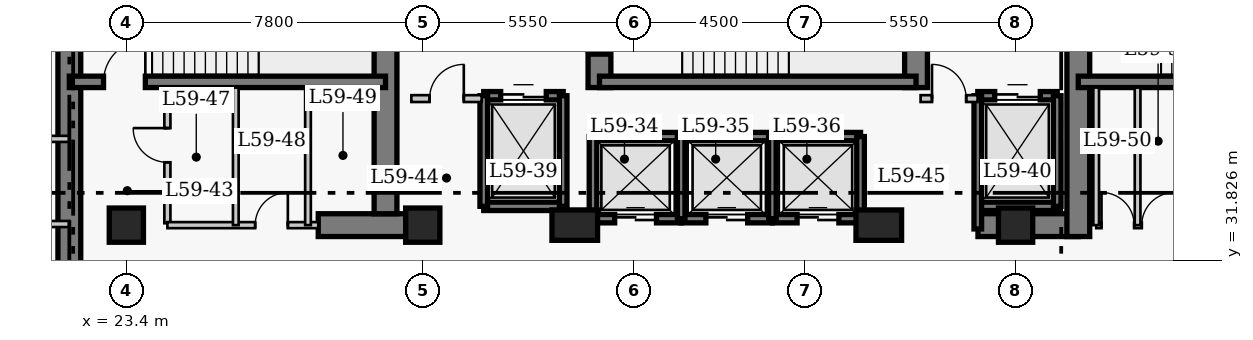
"""IFC4 building model, lengths in metres.
Left out: names, types, materials, properties, quantities, classifications, styles, units other than length and angle.
Written with IfcOpenShell. Run it as: python <this file> out.ifc"""

import sys

from ifc_helpers import new_model, si_unit, direction, frame, frame_2d, origin, origin_2d, place, context, subcontext, project, spatial, rectangle, extrude, element, fill, save


model = new_model("IFC4")
c1 = context("Model", 3, precision=1e-05, world=origin(), true_north=direction((0.0, 1.0)))
c2 = subcontext(c1, "Body", "Model", "MODEL_VIEW")
j1 = project(units=[si_unit("LENGTHUNIT", "METRE"), si_unit("PLANEANGLEUNIT", "RADIAN")], contexts=[c1])
p1 = place(None, origin())
s1 = spatial("IfcSite", under=j1, at=p1, CompositionType="ELEMENT")
p2 = place(p1, origin())
s2 = spatial("IfcBuilding", under=s1, at=p2, CompositionType="ELEMENT")
p3 = place(p2, frame((0.0, 0.0, 236.5)))
s3 = spatial("IfcBuildingStorey", under=s2, at=p3, CompositionType="ELEMENT", Elevation=236.5)
p4 = place(p3, frame((21.9, 27.05, 0.0), z_axis=(0.0, 0.0, 1.0), x_axis=(0.0, 1.0, 0.0)))
e1 = element("IfcWall", 1, at=p4, inside=s3, PredefinedType="SHEAR", context=c2, shape_type="SweptSolid", body=[
    extrude(rectangle(XDim=13.57, YDim=0.6, at=frame_2d((6.785, 0.0))), origin(), (0.0, 0.0, 1.0), 3.9),
])
p5 = place(p3, frame((28.45, 32.75, 0.0), z_axis=(0.0, 0.0, 1.0), x_axis=(1.0, 0.0, 0.0)))
e2 = element("IfcWall", 2, at=p5, inside=s3, PredefinedType="SHEAR", context=c2, shape_type="SweptSolid", body=[
    extrude(rectangle(XDim=2.4, YDim=0.6, at=frame_2d((1.2, 0.0))), origin(), (0.0, 0.0, 1.0), 3.9),
])
p6 = place(p3, frame((45.81, 32.75, 0.0), z_axis=(0.0, 0.0, 1.0), x_axis=(1.0, 0.0, 0.0)))
e3 = element("IfcWall", 3, at=p6, inside=s3, PredefinedType="SHEAR", context=c2, shape_type="SweptSolid", body=[
    extrude(rectangle(XDim=2.64, YDim=0.6, at=frame_2d((1.32, 0.0))), origin(), (0.0, 0.0, 1.0), 3.9),
])
p7 = place(p3, frame((30.22, 33.05, 0.0), z_axis=(0.0, 0.0, 1.0), x_axis=(0.0, 1.0, 0.0)))
e4 = element("IfcWall", 4, at=p7, inside=s3, PredefinedType="SHEAR", context=c2, shape_type="SweptSolid", body=[
    extrude(rectangle(XDim=7.27, YDim=0.6, at=frame_2d((3.635, 0.0))), origin(), (0.0, 0.0, 1.0), 3.9),
])
p8 = place(p3, frame((35.85, 36.37, 0.0), z_axis=(0.0, 0.0, 1.0), x_axis=(0.0, 1.0, 0.0)))
e5 = element("IfcWall", 5, at=p8, inside=s3, PredefinedType="SHEAR", context=c2, shape_type="SweptSolid", body=[
    extrude(rectangle(XDim=3.95, YDim=0.6, at=frame_2d((1.975, 0.0))), origin(), (0.0, 0.0, 1.0), 3.9),
])
p9 = place(p8, frame((0.88, 0.0, 0.0)))
e6 = element("IfcOpeningElement", 6, at=p9, cuts=e5, PredefinedType="OPENING", context=c2, shape_type="SweptSolid", body=[
    extrude(rectangle(XDim=1.1, YDim=2.15, at=frame_2d((0.55, 1.075))), frame((0.0, 0.31, 0.0), z_axis=(0.0, -1.0, 0.0), x_axis=(1.0, 0.0, 0.0)), (0.0, 0.0, 1.0), 0.62),
])
p10 = place(p3, frame((44.18, 36.37, 0.0), z_axis=(0.0, 0.0, 1.0), x_axis=(0.0, 1.0, 0.0)))
e7 = element("IfcWall", 7, at=p10, inside=s3, PredefinedType="SHEAR", context=c2, shape_type="SweptSolid", body=[
    extrude(rectangle(XDim=3.95, YDim=0.6, at=frame_2d((1.975, 0.0))), origin(), (0.0, 0.0, 1.0), 3.9),
])
p11 = place(p3, frame((48.45, 32.45, 0.0), z_axis=(0.0, 0.0, 1.0), x_axis=(0.0, 1.0, 0.0)))
e8 = element("IfcWall", 8, at=p11, inside=s3, PredefinedType="SHEAR", context=c2, shape_type="SweptSolid", body=[
    extrude(rectangle(XDim=7.87, YDim=0.6, at=frame_2d((3.935, 0.0))), origin(), (0.0, 0.0, 1.0), 3.9),
])
p12 = place(p11, frame((5.75, 0.0, 0.0)))
e9 = element("IfcOpeningElement", 9, at=p12, cuts=e8, PredefinedType="OPENING", context=c2, shape_type="SweptSolid", body=[
    extrude(rectangle(XDim=1.1, YDim=2.15, at=frame_2d((0.55, 1.075))), frame((0.0, 0.31, 0.0), z_axis=(0.0, -1.0, 0.0), x_axis=(1.0, 0.0, 0.0)), (0.0, 0.0, 1.0), 0.62),
])
p13 = place(p3, frame((21.9, 36.52, 0.0), z_axis=(0.0, 0.0, 1.0), x_axis=(1.0, 0.0, 0.0)))
e10 = element("IfcWall", 10, at=p13, inside=s3, PredefinedType="SHEAR", context=c2, shape_type="SweptSolid", body=[
    extrude(rectangle(XDim=8.32, YDim=0.3, at=frame_2d((4.16, 0.0))), origin(), (0.0, 0.0, 1.0), 3.9),
])
p14 = place(p13, frame((0.9, 0.0, 0.0)))
e11 = element("IfcOpeningElement", 11, at=p14, cuts=e10, PredefinedType="OPENING", context=c2, shape_type="SweptSolid", body=[
    extrude(rectangle(XDim=1.1, YDim=2.15, at=frame_2d((0.55, 1.075))), frame((0.0, 0.16, 0.0), z_axis=(0.0, -1.0, 0.0), x_axis=(1.0, 0.0, 0.0)), (0.0, 0.0, 1.0), 0.32),
])
p15 = place(p3, frame((35.85, 36.52, 0.0), z_axis=(0.0, 0.0, 1.0), x_axis=(1.0, 0.0, 0.0)))
e12 = element("IfcWall", 12, at=p15, inside=s3, PredefinedType="SHEAR", context=c2, shape_type="SweptSolid", body=[
    extrude(rectangle(XDim=8.33, YDim=0.3, at=frame_2d((4.165, 0.0))), origin(), (0.0, 0.0, 1.0), 3.9),
])
p16 = place(p3, frame((48.45, 36.52, 0.0), z_axis=(0.0, 0.0, 1.0), x_axis=(1.0, 0.0, 0.0)))
e13 = element("IfcWall", 13, at=p16, inside=s3, PredefinedType="SHEAR", context=c2, shape_type="SweptSolid", body=[
    extrude(rectangle(XDim=8.37, YDim=0.3, at=frame_2d((4.185, 0.0))), origin(), (0.0, 0.0, 1.0), 3.9),
])
for number, where, z_axis, x_axis in (
    (14, (23.4, 32.75, 0.0), (0.0, 0.0, 1.0), (1.0, 0.0, 0.0)),
    (15, (31.2, 32.75, 0.0), (0.0, 0.0, 1.0), (1.0, 0.0, 0.0)),
):
    element("IfcColumn", number, at=place(p3, frame(where, z_axis=z_axis, x_axis=x_axis)), inside=s3, PredefinedType="COLUMN", context=c2, shape_type="SweptSolid", body=[
        extrude(rectangle(XDim=0.9, YDim=0.9, at=origin_2d()), origin(), (0.0, 0.0, 1.0), 3.9),
    ])
for number, where, z_axis, x_axis in (
    (16, (35.2, 32.75, 0.0), (0.0, 0.0, 1.0), (1.0, 0.0, 0.0)),
    (17, (43.2, 32.75, 0.0), (0.0, 0.0, 1.0), (1.0, 0.0, 0.0)),
):
    element("IfcColumn", number, at=place(p3, frame(where, z_axis=z_axis, x_axis=x_axis)), inside=s3, PredefinedType="COLUMN", context=c2, shape_type="SweptSolid", body=[
        extrude(rectangle(XDim=1.2, YDim=0.8, at=origin_2d()), origin(), (0.0, 0.0, 1.0), 3.9),
    ])
p17 = place(p3, frame((46.8, 32.75, 0.0), z_axis=(0.0, 0.0, 1.0), x_axis=(1.0, 0.0, 0.0)))
e18 = element("IfcColumn", 18, at=p17, inside=s3, PredefinedType="COLUMN", context=c2, shape_type="SweptSolid", body=[
    extrude(rectangle(XDim=0.9, YDim=0.9, at=origin_2d()), origin(), (0.0, 0.0, 1.0), 3.9),
])
p18 = place(p3, frame((35.68, 35.08, 0.0), z_axis=(0.0, 0.0, 1.0), x_axis=(1.0, 0.0, 0.0)))
e19 = element("IfcWall", 19, at=p18, inside=s3, PredefinedType="SHEAR", context=c2, shape_type="SweptSolid", body=[
    extrude(rectangle(XDim=2.32, YDim=0.22, at=frame_2d((1.16, 0.0))), origin(), (0.0, 0.0, 1.0), 3.9),
])
p19 = place(p3, frame((35.68, 32.92, 0.0), z_axis=(0.0, 0.0, 1.0), x_axis=(1.0, 0.0, 0.0)))
e20 = element("IfcWall", 20, at=p19, inside=s3, PredefinedType="SHEAR", context=c2, shape_type="SweptSolid", body=[
    extrude(rectangle(XDim=2.32, YDim=0.22, at=frame_2d((1.16, 0.0))), origin(), (0.0, 0.0, 1.0), 3.9),
])
p20 = place(p19, frame((0.57, 0.0, 0.0)))
e21 = element("IfcOpeningElement", 21, at=p20, cuts=e20, PredefinedType="OPENING", context=c2, shape_type="SweptSolid", body=[
    extrude(rectangle(XDim=1.1, YDim=2.15, at=frame_2d((0.55, 1.075))), frame((0.0, 0.12, 0.0), z_axis=(0.0, -1.0, 0.0), x_axis=(1.0, 0.0, 0.0)), (0.0, 0.0, 1.0), 0.24),
])
p21 = place(p3, frame((35.68, 32.92, 0.0), z_axis=(0.0, 0.0, 1.0), x_axis=(0.0, 1.0, 0.0)))
e22 = element("IfcWall", 22, at=p21, inside=s3, PredefinedType="SHEAR", context=c2, shape_type="SweptSolid", body=[
    extrude(rectangle(XDim=2.16, YDim=0.2, at=frame_2d((1.08, 0.0))), origin(), (0.0, 0.0, 1.0), 3.9),
])
p22 = place(p3, frame((38.0, 35.08, 0.0), z_axis=(0.0, 0.0, 1.0), x_axis=(1.0, 0.0, 0.0)))
e23 = element("IfcWall", 23, at=p22, inside=s3, PredefinedType="SHEAR", context=c2, shape_type="SweptSolid", body=[
    extrude(rectangle(XDim=2.4, YDim=0.22, at=frame_2d((1.2, 0.0))), origin(), (0.0, 0.0, 1.0), 3.9),
])
p23 = place(p3, frame((38.0, 32.92, 0.0), z_axis=(0.0, 0.0, 1.0), x_axis=(1.0, 0.0, 0.0)))
e24 = element("IfcWall", 24, at=p23, inside=s3, PredefinedType="SHEAR", context=c2, shape_type="SweptSolid", body=[
    extrude(rectangle(XDim=2.4, YDim=0.22, at=frame_2d((1.2, 0.0))), origin(), (0.0, 0.0, 1.0), 3.9),
])
p24 = place(p23, frame((0.65, 0.0, 0.0)))
e25 = element("IfcOpeningElement", 25, at=p24, cuts=e24, PredefinedType="OPENING", context=c2, shape_type="SweptSolid", body=[
    extrude(rectangle(XDim=1.1, YDim=2.15, at=frame_2d((0.55, 1.075))), frame((0.0, 0.12, 0.0), z_axis=(0.0, -1.0, 0.0), x_axis=(1.0, 0.0, 0.0)), (0.0, 0.0, 1.0), 0.24),
])
p25 = place(p3, frame((38.0, 32.92, 0.0), z_axis=(0.0, 0.0, 1.0), x_axis=(0.0, 1.0, 0.0)))
e26 = element("IfcWall", 26, at=p25, inside=s3, PredefinedType="SHEAR", context=c2, shape_type="SweptSolid", body=[
    extrude(rectangle(XDim=2.16, YDim=0.2, at=frame_2d((1.08, 0.0))), origin(), (0.0, 0.0, 1.0), 3.9),
])
p26 = place(p3, frame((40.4, 35.08, 0.0), z_axis=(0.0, 0.0, 1.0), x_axis=(1.0, 0.0, 0.0)))
e27 = element("IfcWall", 27, at=p26, inside=s3, PredefinedType="SHEAR", context=c2, shape_type="SweptSolid", body=[
    extrude(rectangle(XDim=2.32, YDim=0.22, at=frame_2d((1.16, 0.0))), origin(), (0.0, 0.0, 1.0), 3.9),
])
p27 = place(p3, frame((40.4, 32.92, 0.0), z_axis=(0.0, 0.0, 1.0), x_axis=(1.0, 0.0, 0.0)))
e28 = element("IfcWall", 28, at=p27, inside=s3, PredefinedType="SHEAR", context=c2, shape_type="SweptSolid", body=[
    extrude(rectangle(XDim=2.32, YDim=0.22, at=frame_2d((1.16, 0.0))), origin(), (0.0, 0.0, 1.0), 3.9),
])
p28 = place(p27, frame((0.65, 0.0, 0.0)))
e29 = element("IfcOpeningElement", 29, at=p28, cuts=e28, PredefinedType="OPENING", context=c2, shape_type="SweptSolid", body=[
    extrude(rectangle(XDim=1.1, YDim=2.15, at=frame_2d((0.55, 1.075))), frame((0.0, 0.12, 0.0), z_axis=(0.0, -1.0, 0.0), x_axis=(1.0, 0.0, 0.0)), (0.0, 0.0, 1.0), 0.24),
])
for number, where, z_axis, x_axis in (
    (30, (40.4, 32.92, 0.0), (0.0, 0.0, 1.0), (0.0, 1.0, 0.0)),
    (31, (42.72, 32.92, 0.0), (0.0, 0.0, 1.0), (0.0, 1.0, 0.0)),
):
    element("IfcWall", number, at=place(p3, frame(where, z_axis=z_axis, x_axis=x_axis)), inside=s3, PredefinedType="SHEAR", context=c2, shape_type="SweptSolid", body=[
        extrude(rectangle(XDim=2.16, YDim=0.2, at=frame_2d((1.08, 0.0))), origin(), (0.0, 0.0, 1.0), 3.9),
    ])
p29 = place(p3, frame((32.805, 36.155, 0.0), z_axis=(0.0, 0.0, 1.0), x_axis=(1.0, 0.0, 0.0)))
e32 = element("IfcWall", 32, at=p29, inside=s3, PredefinedType="SHEAR", context=c2, shape_type="SweptSolid", body=[
    extrude(rectangle(XDim=2.09, YDim=0.22, at=frame_2d((1.045, 0.0))), origin(), (0.0, 0.0, 1.0), 3.9),
])
p30 = place(p29, frame((0.445, 0.0, 0.0)))
e33 = element("IfcOpeningElement", 33, at=p30, cuts=e32, PredefinedType="OPENING", context=c2, shape_type="SweptSolid", body=[
    extrude(rectangle(XDim=1.2, YDim=2.15, at=frame_2d((0.6, 1.075))), frame((0.0, 0.12, 0.0), z_axis=(0.0, -1.0, 0.0), x_axis=(1.0, 0.0, 0.0)), (0.0, 0.0, 1.0), 0.24),
])
p31 = place(p3, frame((32.805, 33.245, 0.0), z_axis=(0.0, 0.0, 1.0), x_axis=(1.0, 0.0, 0.0)))
e34 = element("IfcWall", 34, at=p31, inside=s3, PredefinedType="SHEAR", context=c2, shape_type="SweptSolid", body=[
    extrude(rectangle(XDim=2.09, YDim=0.22, at=frame_2d((1.045, 0.0))), origin(), (0.0, 0.0, 1.0), 3.9),
])
for number, where, z_axis, x_axis in (
    (35, (32.805, 33.245, 0.0), (0.0, 0.0, 1.0), (0.0, 1.0, 0.0)),
    (36, (34.895, 33.245, 0.0), (0.0, 0.0, 1.0), (0.0, 1.0, 0.0)),
):
    element("IfcWall", number, at=place(p3, frame(where, z_axis=z_axis, x_axis=x_axis)), inside=s3, PredefinedType="SHEAR", context=c2, shape_type="SweptSolid", body=[
        extrude(rectangle(XDim=2.91, YDim=0.2, at=frame_2d((1.455, 0.0))), origin(), (0.0, 0.0, 1.0), 3.9),
    ])
p32 = place(p3, frame((45.805, 36.155, 0.0), z_axis=(0.0, 0.0, 1.0), x_axis=(1.0, 0.0, 0.0)))
e37 = element("IfcWall", 37, at=p32, inside=s3, PredefinedType="SHEAR", context=c2, shape_type="SweptSolid", body=[
    extrude(rectangle(XDim=2.09, YDim=0.22, at=frame_2d((1.045, 0.0))), origin(), (0.0, 0.0, 1.0), 3.9),
])
p33 = place(p32, frame((0.445, 0.0, 0.0)))
e38 = element("IfcOpeningElement", 38, at=p33, cuts=e37, PredefinedType="OPENING", context=c2, shape_type="SweptSolid", body=[
    extrude(rectangle(XDim=1.2, YDim=2.15, at=frame_2d((0.6, 1.075))), frame((0.0, 0.12, 0.0), z_axis=(0.0, -1.0, 0.0), x_axis=(1.0, 0.0, 0.0)), (0.0, 0.0, 1.0), 0.24),
])
p34 = place(p3, frame((45.805, 33.245, 0.0), z_axis=(0.0, 0.0, 1.0), x_axis=(1.0, 0.0, 0.0)))
e39 = element("IfcWall", 39, at=p34, inside=s3, PredefinedType="SHEAR", context=c2, shape_type="SweptSolid", body=[
    extrude(rectangle(XDim=2.09, YDim=0.22, at=frame_2d((1.045, 0.0))), origin(), (0.0, 0.0, 1.0), 3.9),
])
p35 = place(p3, frame((45.805, 32.65, 0.0), z_axis=(0.0, 0.0, 1.0), x_axis=(0.0, 1.0, 0.0)))
e40 = element("IfcWall", 40, at=p35, inside=s3, PredefinedType="SHEAR", context=c2, shape_type="SweptSolid", body=[
    extrude(rectangle(XDim=3.505, YDim=0.2, at=frame_2d((1.752, 0.0))), origin(), (0.0, 0.0, 1.0), 3.9),
])
p36 = place(p3, frame((47.895, 33.245, 0.0), z_axis=(0.0, 0.0, 1.0), x_axis=(0.0, 1.0, 0.0)))
e41 = element("IfcWall", 41, at=p36, inside=s3, PredefinedType="SHEAR", context=c2, shape_type="SweptSolid", body=[
    extrude(rectangle(XDim=2.91, YDim=0.2, at=frame_2d((1.455, 0.0))), origin(), (0.0, 0.0, 1.0), 3.9),
])
p37 = place(p3, frame((30.9, 36.08, 0.0), z_axis=(0.0, 0.0, 1.0), x_axis=(1.0, 0.0, 0.0)))
e42 = element("IfcWall", 42, at=p37, inside=s3, PredefinedType="PARTITIONING", context=c2, shape_type="SweptSolid", body=[
    extrude(rectangle(XDim=1.85, YDim=0.18, at=frame_2d((0.925, 0.0))), origin(), (0.0, 0.0, 1.0), 3.52),
])
p38 = place(p37, frame((0.48, 0.0, 0.0)))
e43 = element("IfcOpeningElement", 43, at=p38, cuts=e42, PredefinedType="OPENING", context=c2, shape_type="SweptSolid", body=[
    extrude(rectangle(XDim=0.9, YDim=2.15, at=frame_2d((0.45, 1.075))), frame((0.0, 0.1, 0.0), z_axis=(0.0, -1.0, 0.0), x_axis=(1.0, 0.0, 0.0)), (0.0, 0.0, 1.0), 0.2),
])
p39 = place(p3, frame((44.3, 36.08, 0.0), z_axis=(0.0, 0.0, 1.0), x_axis=(1.0, 0.0, 0.0)))
e44 = element("IfcWall", 44, at=p39, inside=s3, PredefinedType="PARTITIONING", context=c2, shape_type="SweptSolid", body=[
    extrude(rectangle(XDim=1.5, YDim=0.18, at=frame_2d((0.75, 0.0))), origin(), (0.0, 0.0, 1.0), 3.52),
])
p40 = place(p39, frame((0.3, 0.0, 0.0)))
e45 = element("IfcOpeningElement", 45, at=p40, cuts=e44, PredefinedType="OPENING", context=c2, shape_type="SweptSolid", body=[
    extrude(rectangle(XDim=0.9, YDim=2.15, at=frame_2d((0.45, 1.075))), frame((0.0, 0.1, 0.0), z_axis=(0.0, -1.0, 0.0), x_axis=(1.0, 0.0, 0.0)), (0.0, 0.0, 1.0), 0.2),
])
p41 = place(p3, frame((24.48, 32.8, 0.0), z_axis=(0.0, 0.0, 1.0), x_axis=(0.0, 1.0, 0.0)))
e46 = element("IfcWall", 46, at=p41, inside=s3, PredefinedType="PARTITIONING", context=c2, shape_type="SweptSolid", body=[
    extrude(rectangle(XDim=3.57, YDim=0.16, at=frame_2d((1.785, 0.0))), origin(), (0.0, 0.0, 1.0), 3.52),
])
p42 = place(p41, frame((1.604, 0.0, 0.0)))
e47 = element("IfcOpeningElement", 47, at=p42, cuts=e46, PredefinedType="OPENING", context=c2, shape_type="SweptSolid", body=[
    extrude(rectangle(XDim=0.9, YDim=2.1, at=frame_2d((0.45, 1.05))), frame((0.0, 0.09, 0.0), z_axis=(0.0, -1.0, 0.0), x_axis=(1.0, 0.0, 0.0)), (0.0, 0.0, 1.0), 0.18),
])
p43 = place(p3, frame((24.48, 32.75, 0.0), z_axis=(0.0, 0.0, 1.0), x_axis=(1.0, 0.0, 0.0)))
e48 = element("IfcWall", 48, at=p43, inside=s3, PredefinedType="PARTITIONING", context=c2, shape_type="SweptSolid", body=[
    extrude(rectangle(XDim=3.97, YDim=0.16, at=frame_2d((1.985, 0.0))), origin(), (0.0, 0.0, 1.0), 3.52),
])
p44 = place(p43, frame((2.31, 0.0, 0.0)))
e49 = element("IfcOpeningElement", 49, at=p44, cuts=e48, PredefinedType="OPENING", context=c2, shape_type="SweptSolid", body=[
    extrude(rectangle(XDim=0.86, YDim=2.05, at=frame_2d((0.43, 1.025))), frame((0.0, 0.09, 0.0), z_axis=(0.0, -1.0, 0.0), x_axis=(1.0, 0.0, 0.0)), (0.0, 0.0, 1.0), 0.18),
])
p45 = place(p3, frame((48.92, 32.75, 0.0), z_axis=(0.0, 0.0, 1.0), x_axis=(1.0, 0.0, 0.0)))
e50 = element("IfcWall", 50, at=p45, inside=s3, PredefinedType="PARTITIONING", context=c2, shape_type="SweptSolid", body=[
    extrude(rectangle(XDim=2.2, YDim=0.16, at=frame_2d((1.1, 0.0))), origin(), (0.0, 0.0, 1.0), 3.52),
])
p46 = place(p45, frame((0.14, 0.0, 0.0)))
e51 = element("IfcOpeningElement", 51, at=p46, cuts=e50, PredefinedType="OPENING", context=c2, shape_type="SweptSolid", body=[
    extrude(rectangle(XDim=0.86, YDim=2.05, at=frame_2d((0.43, 1.025))), frame((0.0, 0.09, 0.0), z_axis=(0.0, -1.0, 0.0), x_axis=(1.0, 0.0, 0.0)), (0.0, 0.0, 1.0), 0.18),
])
p47 = place(p45, frame((1.2, 0.0, 0.0)))
e52 = element("IfcOpeningElement", 52, at=p47, cuts=e50, PredefinedType="OPENING", context=c2, shape_type="SweptSolid", body=[
    extrude(rectangle(XDim=0.86, YDim=2.05, at=frame_2d((0.43, 1.025))), frame((0.0, 0.09, 0.0), z_axis=(0.0, -1.0, 0.0), x_axis=(1.0, 0.0, 0.0)), (0.0, 0.0, 1.0), 0.18),
])
for number, where, z_axis, x_axis in (
    (53, (48.92, 32.75, 0.0), (0.0, 0.0, 1.0), (0.0, 1.0, 0.0)),
    (54, (26.28, 32.75, 0.0), (0.0, 0.0, 1.0), (0.0, 1.0, 0.0)),
    (55, (28.18, 32.75, 0.0), (0.0, 0.0, 1.0), (0.0, 1.0, 0.0)),
    (56, (50.01, 32.75, 0.0), (0.0, 0.0, 1.0), (0.0, 1.0, 0.0)),
):
    element("IfcWall", number, at=place(p3, frame(where, z_axis=z_axis, x_axis=x_axis)), inside=s3, PredefinedType="PARTITIONING", context=c2, shape_type="SweptSolid", body=[
        extrude(rectangle(XDim=3.62, YDim=0.15, at=frame_2d((1.81, 0.0))), origin(), (0.0, 0.0, 1.0), 3.52),
    ])
for number, where, z_axis, x_axis in (
    (57, (19.41, 35.02, 0.0), (0.0, 0.0, 1.0), (1.0, 0.0, 0.0)),
    (58, (19.41, 32.78, 0.0), (0.0, 0.0, 1.0), (1.0, 0.0, 0.0)),
):
    element("IfcWall", number, at=place(p3, frame(where, z_axis=z_axis, x_axis=x_axis)), inside=s3, PredefinedType="PARTITIONING", context=c2, shape_type="SweptSolid", body=[
        extrude(rectangle(XDim=2.49, YDim=0.16, at=frame_2d((1.245, 0.0))), origin(), (0.0, 0.0, 1.0), 3.52),
    ])
p48 = place(p20, origin())
e59 = element("IfcDoor", 59, at=p48, inside=s3, OperationType="DOUBLE_DOOR_SLIDING", PredefinedType="DOOR", context=c2, shape_type="SweptSolid", body=[
    extrude(rectangle(XDim=1.1, YDim=2.15, at=frame_2d((0.55, 1.075))), frame((0.0, 0.025, 0.0), z_axis=(0.0, -1.0, 0.0), x_axis=(1.0, 0.0, 0.0)), (0.0, 0.0, 1.0), 0.05),
])
fill(e21, e59)
p49 = place(p24, origin())
e60 = element("IfcDoor", 60, at=p49, inside=s3, OperationType="DOUBLE_DOOR_SLIDING", PredefinedType="DOOR", context=c2, shape_type="SweptSolid", body=[
    extrude(rectangle(XDim=1.1, YDim=2.15, at=frame_2d((0.55, 1.075))), frame((0.0, 0.025, 0.0), z_axis=(0.0, -1.0, 0.0), x_axis=(1.0, 0.0, 0.0)), (0.0, 0.0, 1.0), 0.05),
])
fill(e25, e60)
p50 = place(p28, origin())
e61 = element("IfcDoor", 61, at=p50, inside=s3, OperationType="DOUBLE_DOOR_SLIDING", PredefinedType="DOOR", context=c2, shape_type="SweptSolid", body=[
    extrude(rectangle(XDim=1.1, YDim=2.15, at=frame_2d((0.55, 1.075))), frame((0.0, 0.025, 0.0), z_axis=(0.0, -1.0, 0.0), x_axis=(1.0, 0.0, 0.0)), (0.0, 0.0, 1.0), 0.05),
])
fill(e29, e61)
p51 = place(p30, origin())
e62 = element("IfcDoor", 62, at=p51, inside=s3, OperationType="DOUBLE_DOOR_SLIDING", PredefinedType="DOOR", context=c2, shape_type="SweptSolid", body=[
    extrude(rectangle(XDim=1.2, YDim=2.15, at=frame_2d((0.6, 1.075))), frame((0.0, 0.025, 0.0), z_axis=(0.0, -1.0, 0.0), x_axis=(1.0, 0.0, 0.0)), (0.0, 0.0, 1.0), 0.05),
])
fill(e33, e62)
p52 = place(p33, origin())
e63 = element("IfcDoor", 63, at=p52, inside=s3, OperationType="DOUBLE_DOOR_SLIDING", PredefinedType="DOOR", context=c2, shape_type="SweptSolid", body=[
    extrude(rectangle(XDim=1.2, YDim=2.15, at=frame_2d((0.6, 1.075))), frame((0.0, 0.025, 0.0), z_axis=(0.0, -1.0, 0.0), x_axis=(1.0, 0.0, 0.0)), (0.0, 0.0, 1.0), 0.05),
])
fill(e38, e63)
p53 = place(p38, origin())
e64 = element("IfcDoor", 64, at=p53, inside=s3, OperationType="SINGLE_SWING_RIGHT", PredefinedType="DOOR", context=c2, shape_type="SweptSolid", body=[
    extrude(rectangle(XDim=0.9, YDim=2.15, at=frame_2d((0.45, 1.075))), frame((0.0, 0.025, 0.0), z_axis=(0.0, -1.0, 0.0), x_axis=(1.0, 0.0, 0.0)), (0.0, 0.0, 1.0), 0.05),
])
fill(e43, e64)
p54 = place(p40, origin())
e65 = element("IfcDoor", 65, at=p54, inside=s3, OperationType="SINGLE_SWING_LEFT", PredefinedType="DOOR", context=c2, shape_type="SweptSolid", body=[
    extrude(rectangle(XDim=0.9, YDim=2.15, at=frame_2d((0.45, 1.075))), frame((0.0, 0.025, 0.0), z_axis=(0.0, -1.0, 0.0), x_axis=(1.0, 0.0, 0.0)), (0.0, 0.0, 1.0), 0.05),
])
fill(e45, e65)
p55 = place(p42, origin())
e66 = element("IfcDoor", 66, at=p55, inside=s3, OperationType="SINGLE_SWING_RIGHT", PredefinedType="DOOR", context=c2, shape_type="SweptSolid", body=[
    extrude(rectangle(XDim=0.9, YDim=2.1, at=frame_2d((0.45, 1.05))), frame((0.0, 0.025, 0.0), z_axis=(0.0, -1.0, 0.0), x_axis=(1.0, 0.0, 0.0)), (0.0, 0.0, 1.0), 0.05),
])
fill(e47, e66)
p56 = place(p44, origin())
e67 = element("IfcDoor", 67, at=p56, inside=s3, OperationType="SINGLE_SWING_RIGHT", PredefinedType="DOOR", context=c2, shape_type="SweptSolid", body=[
    extrude(rectangle(XDim=0.86, YDim=2.05, at=frame_2d((0.43, 1.025))), frame((0.0, 0.025, 0.0), z_axis=(0.0, -1.0, 0.0), x_axis=(1.0, 0.0, 0.0)), (0.0, 0.0, 1.0), 0.05),
])
fill(e49, e67)
p57 = place(p46, origin())
e68 = element("IfcDoor", 68, at=p57, inside=s3, OperationType="SINGLE_SWING_LEFT", PredefinedType="DOOR", context=c2, shape_type="SweptSolid", body=[
    extrude(rectangle(XDim=0.86, YDim=2.05, at=frame_2d((0.43, 1.025))), frame((0.0, 0.025, 0.0), z_axis=(0.0, -1.0, 0.0), x_axis=(1.0, 0.0, 0.0)), (0.0, 0.0, 1.0), 0.05),
])
fill(e51, e68)
p58 = place(p47, origin())
e69 = element("IfcDoor", 69, at=p58, inside=s3, OperationType="SINGLE_SWING_RIGHT", PredefinedType="DOOR", context=c2, shape_type="SweptSolid", body=[
    extrude(rectangle(XDim=0.86, YDim=2.05, at=frame_2d((0.43, 1.025))), frame((0.0, 0.025, 0.0), z_axis=(0.0, -1.0, 0.0), x_axis=(1.0, 0.0, 0.0)), (0.0, 0.0, 1.0), 0.05),
])
fill(e52, e69)
p59 = place(p14, origin())
e70 = element("IfcDoor", 70, at=p59, inside=s3, OperationType="SINGLE_SWING_RIGHT", PredefinedType="DOOR", context=c2, shape_type="SweptSolid", body=[
    extrude(rectangle(XDim=1.1, YDim=2.15, at=frame_2d((0.55, 1.075))), frame((0.0, 0.025, 0.0), z_axis=(0.0, -1.0, 0.0), x_axis=(1.0, 0.0, 0.0)), (0.0, 0.0, 1.0), 0.05),
])
fill(e11, e70)
p60 = place(p9, origin())
e71 = element("IfcDoor", 71, at=p60, inside=s3, OperationType="SINGLE_SWING_RIGHT", PredefinedType="DOOR", context=c2, shape_type="SweptSolid", body=[
    extrude(rectangle(XDim=1.1, YDim=2.15, at=frame_2d((0.55, 1.075))), frame((0.0, 0.025, 0.0), z_axis=(0.0, -1.0, 0.0), x_axis=(1.0, 0.0, 0.0)), (0.0, 0.0, 1.0), 0.05),
])
fill(e6, e71)
save(model, sys.argv[1])
